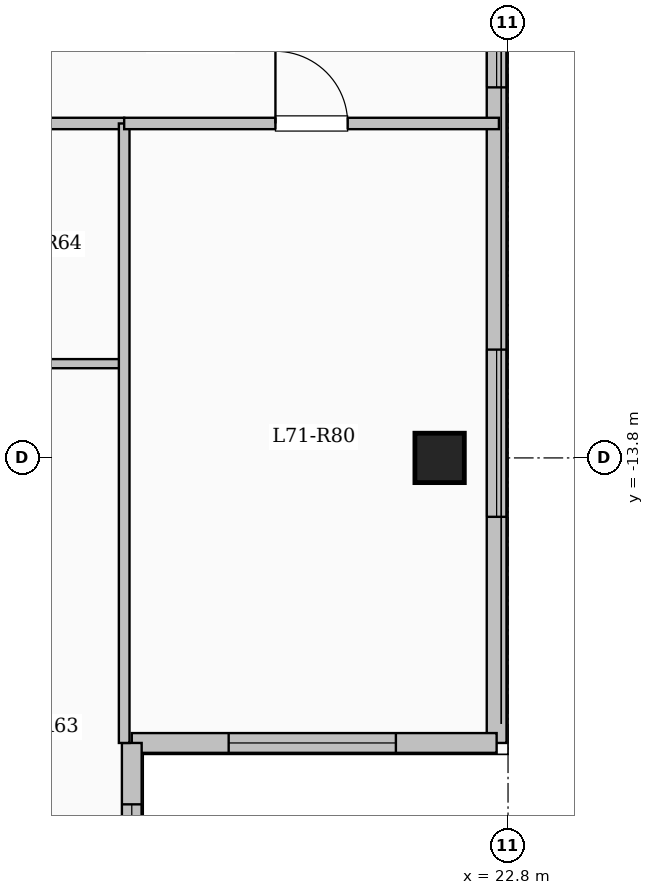
"""IFC4 building model, lengths in metres.
Left out: names, types, materials, properties, quantities, classifications, styles, units other than length and angle.
Written with IfcOpenShell. Run it as: python <this file> out.ifc"""

import sys

from ifc_helpers import new_model, si_unit, direction, frame, frame_2d, origin, origin_2d, place, context, subcontext, project, spatial, rectangle, extrude, element, fill, save


model = new_model("IFC4")
c1 = context("Model", 3, precision=1e-05, world=origin(), true_north=direction((0.0, 1.0)))
c2 = subcontext(c1, "Body", "Model", "MODEL_VIEW")
j1 = project(units=[si_unit("LENGTHUNIT", "METRE"), si_unit("PLANEANGLEUNIT", "RADIAN")], contexts=[c1])
p1 = place(None, origin())
s1 = spatial("IfcSite", under=j1, at=p1, CompositionType="ELEMENT")
p2 = place(p1, origin())
s2 = spatial("IfcBuilding", under=s1, at=p2, CompositionType="ELEMENT")
p3 = place(p2, frame((0.0, 0.0, 261.6)))
s3 = spatial("IfcBuildingStorey", under=s2, at=p3, CompositionType="ELEMENT", Elevation=261.6)
p4 = place(p3, frame((21.9, -13.8, 0.0), z_axis=(0.0, 0.0, 1.0), x_axis=(1.0, 0.0, 0.0)))
e1 = element("IfcColumn", 1, at=p4, inside=s3, PredefinedType="COLUMN", context=c2, shape_type="SweptSolid", body=[
    extrude(rectangle(XDim=0.65, YDim=0.65, at=origin_2d()), origin(), (0.0, 0.0, 1.0), 3.35),
])
p5 = place(p3, frame((22.65, 17.55, 0.0), z_axis=(0.0, 0.0, 1.0), x_axis=(0.0, -1.0, 0.0)))
e2 = element("IfcWall", 2, at=p5, inside=s3, PredefinedType="SOLIDWALL", context=c2, shape_type="SweptSolid", body=[
    extrude(rectangle(XDim=35.1, YDim=0.26, at=frame_2d((17.55, 0.0))), origin(), (0.0, 0.0, 1.0), 3.1),
])
p6 = place(p5, frame((1.525, 0.0, 0.9)))
e3 = element("IfcOpeningElement", 3, at=p6, cuts=e2, PredefinedType="OPENING", context=c2, shape_type="SweptSolid", body=[
    extrude(rectangle(XDim=2.0, YDim=1.7, at=frame_2d((1.0, 0.85))), frame((0.0, 0.14, 0.0), z_axis=(0.0, -1.0, 0.0), x_axis=(1.0, 0.0, 0.0)), (0.0, 0.0, 1.0), 0.28),
])
p7 = place(p5, frame((5.425, 0.0, 0.95)))
e4 = element("IfcOpeningElement", 4, at=p7, cuts=e2, PredefinedType="OPENING", context=c2, shape_type="SweptSolid", body=[
    extrude(rectangle(XDim=1.0, YDim=1.5, at=frame_2d((0.5, 0.75))), frame((0.0, 0.14, 0.0), z_axis=(0.0, -1.0, 0.0), x_axis=(1.0, 0.0, 0.0)), (0.0, 0.0, 1.0), 0.28),
])
p8 = place(p5, frame((14.8, 0.0, 0.9)))
e5 = element("IfcOpeningElement", 5, at=p8, cuts=e2, PredefinedType="OPENING", context=c2, shape_type="SweptSolid", body=[
    extrude(rectangle(XDim=2.0, YDim=1.7, at=frame_2d((1.0, 0.85))), frame((0.0, 0.14, 0.0), z_axis=(0.0, -1.0, 0.0), x_axis=(1.0, 0.0, 0.0)), (0.0, 0.0, 1.0), 0.28),
])
p9 = place(p5, frame((25.275, 0.0, 0.95)))
e6 = element("IfcOpeningElement", 6, at=p9, cuts=e2, PredefinedType="OPENING", context=c2, shape_type="SweptSolid", body=[
    extrude(rectangle(XDim=1.2, YDim=1.5, at=frame_2d((0.6, 0.75))), frame((0.0, 0.14, 0.0), z_axis=(0.0, -1.0, 0.0), x_axis=(1.0, 0.0, 0.0)), (0.0, 0.0, 1.0), 0.28),
])
p10 = place(p5, frame((29.925, 0.0, 0.9)))
e7 = element("IfcOpeningElement", 7, at=p10, cuts=e2, PredefinedType="OPENING", context=c2, shape_type="SweptSolid", body=[
    extrude(rectangle(XDim=2.2, YDim=1.75, at=frame_2d((1.1, 0.875))), frame((0.0, 0.14, 0.0), z_axis=(0.0, -1.0, 0.0), x_axis=(1.0, 0.0, 0.0)), (0.0, 0.0, 1.0), 0.28),
])
p11 = place(p3, frame((22.65, -17.55, 0.0), z_axis=(0.0, 0.0, 1.0), x_axis=(-1.0, 0.0, 0.0)))
e8 = element("IfcWall", 8, at=p11, inside=s3, PredefinedType="SOLIDWALL", context=c2, shape_type="SweptSolid", body=[
    extrude(rectangle(XDim=4.8, YDim=0.26, at=frame_2d((2.4, 0.0))), origin(), (0.0, 0.0, 1.0), 3.1),
])
p12 = place(p11, frame((1.325, 0.0, 0.9)))
e9 = element("IfcOpeningElement", 9, at=p12, cuts=e8, PredefinedType="OPENING", context=c2, shape_type="SweptSolid", body=[
    extrude(rectangle(XDim=2.2, YDim=1.75, at=frame_2d((1.1, 0.875))), frame((0.0, 0.14, 0.0), z_axis=(0.0, -1.0, 0.0), x_axis=(1.0, 0.0, 0.0)), (0.0, 0.0, 1.0), 0.28),
])
p13 = place(p3, frame((17.85, -17.55, 0.0), z_axis=(0.0, 0.0, 1.0), x_axis=(0.0, -1.0, 0.0)))
e10 = element("IfcWall", 10, at=p13, inside=s3, PredefinedType="SOLIDWALL", context=c2, shape_type="SweptSolid", body=[
    extrude(rectangle(XDim=3.3, YDim=0.26, at=frame_2d((1.65, 0.0))), origin(), (0.0, 0.0, 1.0), 3.1),
])
p14 = place(p13, frame((0.808, 0.0, 0.9)))
e11 = element("IfcOpeningElement", 11, at=p14, cuts=e10, PredefinedType="OPENING", context=c2, shape_type="SweptSolid", body=[
    extrude(rectangle(XDim=1.65, YDim=1.6, at=frame_2d((0.825, 0.8))), frame((0.0, 0.14, 0.0), z_axis=(0.0, -1.0, 0.0), x_axis=(1.0, 0.0, 0.0)), (0.0, 0.0, 1.0), 0.28),
])
p15 = place(p3, frame((8.55, -9.4, 0.0), z_axis=(0.0, 0.0, 1.0), x_axis=(1.0, 0.0, 0.0)))
e12 = element("IfcWall", 12, at=p15, inside=s3, PredefinedType="PARTITIONING", context=c2, shape_type="SweptSolid", body=[
    extrude(rectangle(XDim=9.2, YDim=0.15, at=frame_2d((4.6, 0.0))), origin(), (0.0, 0.0, 1.0), 3.1),
])
p16 = place(p15, frame((0.75, 0.0, 0.0)))
e13 = element("IfcOpeningElement", 13, at=p16, cuts=e12, PredefinedType="OPENING", context=c2, shape_type="SweptSolid", body=[
    extrude(rectangle(XDim=0.96, YDim=2.15, at=frame_2d((0.48, 1.075))), frame((0.0, 0.085, 0.0), z_axis=(0.0, -1.0, 0.0), x_axis=(1.0, 0.0, 0.0)), (0.0, 0.0, 1.0), 0.17),
])
p17 = place(p15, frame((5.142, 0.0, 0.0)))
e14 = element("IfcOpeningElement", 14, at=p17, cuts=e12, PredefinedType="OPENING", context=c2, shape_type="SweptSolid", body=[
    extrude(rectangle(XDim=0.96, YDim=2.15, at=frame_2d((0.48, 1.075))), frame((0.0, 0.085, 0.0), z_axis=(0.0, -1.0, 0.0), x_axis=(1.0, 0.0, 0.0)), (0.0, 0.0, 1.0), 0.17),
])
p18 = place(p3, frame((15.404, -12.56, 0.0), z_axis=(0.0, 0.0, 1.0), x_axis=(1.0, 0.0, 0.0)))
e15 = element("IfcWall", 15, at=p18, inside=s3, PredefinedType="PARTITIONING", context=c2, shape_type="SweptSolid", body=[
    extrude(rectangle(XDim=2.406, YDim=0.12, at=frame_2d((1.203, 0.0))), origin(), (0.0, 0.0, 1.0), 3.1),
])
p19 = place(p3, frame((17.75, -17.55, 0.0), z_axis=(0.0, 0.0, 1.0), x_axis=(0.0, 1.0, 0.0)))
e16 = element("IfcWall", 16, at=p19, inside=s3, PredefinedType="PARTITIONING", context=c2, shape_type="SweptSolid", body=[
    extrude(rectangle(XDim=8.15, YDim=0.14, at=frame_2d((4.075, 0.0))), origin(), (0.0, 0.0, 1.0), 3.1),
])
p20 = place(p3, frame((17.75, -9.4, 0.0), z_axis=(0.0, 0.0, 1.0), x_axis=(1.0, 0.0, 0.0)))
e17 = element("IfcWall", 17, at=p20, inside=s3, PredefinedType="PARTITIONING", context=c2, shape_type="SweptSolid", body=[
    extrude(rectangle(XDim=4.93, YDim=0.15, at=frame_2d((2.465, 0.0))), origin(), (0.0, 0.0, 1.0), 3.1),
])
p21 = place(p20, frame((1.99, 0.0, 0.0)))
e18 = element("IfcOpeningElement", 18, at=p21, cuts=e17, PredefinedType="OPENING", context=c2, shape_type="SweptSolid", body=[
    extrude(rectangle(XDim=0.95, YDim=2.15, at=frame_2d((0.475, 1.075))), frame((0.0, 0.085, 0.0), z_axis=(0.0, -1.0, 0.0), x_axis=(1.0, 0.0, 0.0)), (0.0, 0.0, 1.0), 0.17),
])
p22 = place(p9, origin())
e19 = element("IfcWindow", 19, at=p22, inside=s3, PartitioningType="SINGLE_PANEL", PredefinedType="WINDOW", context=c2, shape_type="SweptSolid", body=[
    extrude(rectangle(XDim=1.2, YDim=1.5, at=frame_2d((0.6, 0.75))), frame((0.0, 0.03, 0.0), z_axis=(0.0, -1.0, 0.0), x_axis=(1.0, 0.0, 0.0)), (0.0, 0.0, 1.0), 0.06),
])
fill(e6, e19)
p23 = place(p10, origin())
e20 = element("IfcWindow", 20, at=p23, inside=s3, PartitioningType="SINGLE_PANEL", PredefinedType="WINDOW", context=c2, shape_type="SweptSolid", body=[
    extrude(rectangle(XDim=2.2, YDim=1.75, at=frame_2d((1.1, 0.875))), frame((0.0, 0.03, 0.0), z_axis=(0.0, -1.0, 0.0), x_axis=(1.0, 0.0, 0.0)), (0.0, 0.0, 1.0), 0.06),
])
fill(e7, e20)
p24 = place(p12, origin())
e21 = element("IfcWindow", 21, at=p24, inside=s3, PartitioningType="SINGLE_PANEL", PredefinedType="WINDOW", context=c2, shape_type="SweptSolid", body=[
    extrude(rectangle(XDim=2.2, YDim=1.75, at=frame_2d((1.1, 0.875))), frame((0.0, 0.03, 0.0), z_axis=(0.0, -1.0, 0.0), x_axis=(1.0, 0.0, 0.0)), (0.0, 0.0, 1.0), 0.06),
])
fill(e9, e21)
p25 = place(p14, origin())
e22 = element("IfcWindow", 22, at=p25, inside=s3, PartitioningType="SINGLE_PANEL", PredefinedType="WINDOW", context=c2, shape_type="SweptSolid", body=[
    extrude(rectangle(XDim=1.65, YDim=1.6, at=frame_2d((0.825, 0.8))), frame((0.0, 0.03, 0.0), z_axis=(0.0, -1.0, 0.0), x_axis=(1.0, 0.0, 0.0)), (0.0, 0.0, 1.0), 0.06),
])
fill(e11, e22)
p26 = place(p21, origin())
e23 = element("IfcDoor", 23, at=p26, inside=s3, OperationType="SINGLE_SWING_LEFT", PredefinedType="DOOR", context=c2, shape_type="SweptSolid", body=[
    extrude(rectangle(XDim=0.95, YDim=2.15, at=frame_2d((0.475, 1.075))), frame((0.0, 0.025, 0.0), z_axis=(0.0, -1.0, 0.0), x_axis=(1.0, 0.0, 0.0)), (0.0, 0.0, 1.0), 0.05),
])
fill(e18, e23)
save(model, sys.argv[1])
